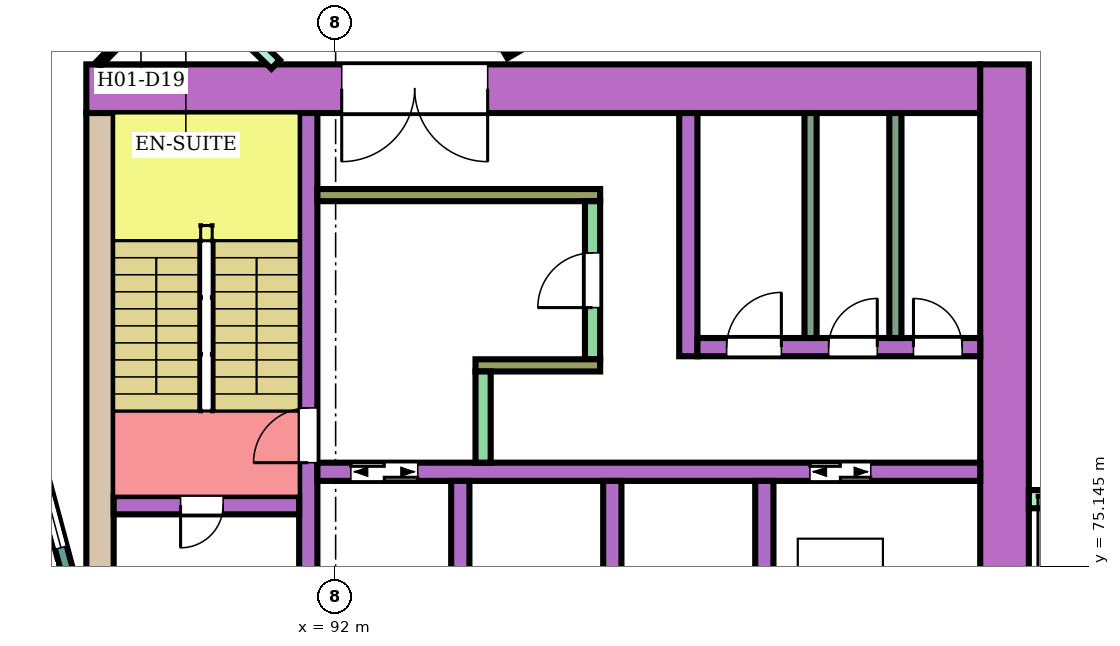
"""IFC4 building model, lengths in metres.
Left out: names, types, materials, properties, quantities, classifications, styles, units other than length and angle.
Written with IfcOpenShell. Run it as: python <this file> out.ifc"""

import sys

from ifc_helpers import new_model, si_unit, direction, frame, frame_2d, origin, place, context, subcontext, project, spatial, rectangle, extrude, element, fill, save


model = new_model("IFC4")
c1 = context("Model", 3, precision=1e-05, world=origin(), true_north=direction((0.0, 1.0)))
c2 = subcontext(c1, "Body", "Model", "MODEL_VIEW")
j1 = project(units=[si_unit("LENGTHUNIT", "METRE"), si_unit("PLANEANGLEUNIT", "RADIAN")], contexts=[c1])
p1 = place(None, origin())
s1 = spatial("IfcSite", under=j1, at=p1, CompositionType="ELEMENT")
p2 = place(p1, origin())
s2 = spatial("IfcBuilding", under=s1, at=p2, CompositionType="ELEMENT")
p3 = place(p2, frame((0.0, 0.0, 28.8)))
s3 = spatial("IfcBuildingStorey", under=s2, at=p3, CompositionType="ELEMENT", Elevation=28.8)
p4 = place(p3, frame((87.9, 83.0, 0.0), z_axis=(0.0, 0.0, 1.0), x_axis=(1.0, 0.0, 0.0)))
e1 = element("IfcWall", 1, at=p4, inside=s3, PredefinedType="SHEAR", context=c2, shape_type="SweptSolid", body=[
    extrude(rectangle(XDim=14.7, YDim=0.8, at=frame_2d((7.35, 0.0))), origin(), (0.0, 0.0, 1.0), 3.48),
])
p5 = place(p4, frame((4.2, 0.0, 0.0)))
e2 = element("IfcOpeningElement", 2, at=p5, cuts=e1, PredefinedType="OPENING", context=c2, shape_type="SweptSolid", body=[
    extrude(rectangle(XDim=2.4, YDim=2.4, at=frame_2d((1.2, 1.2))), frame((0.0, 0.41, 0.0), z_axis=(0.0, -1.0, 0.0), x_axis=(1.0, 0.0, 0.0)), (0.0, 0.0, 1.0), 0.82),
])
p6 = place(p3, frame((88.125, 75.0, 0.0), z_axis=(0.0, 0.0, 1.0), x_axis=(0.0, 1.0, 0.0)))
e3 = element("IfcWall", 3, at=p6, inside=s3, PredefinedType="SHEAR", context=c2, shape_type="SweptSolid", body=[
    extrude(rectangle(XDim=7.6, YDim=0.45, at=frame_2d((3.8, 0.0))), origin(), (0.0, 0.0, 1.0), 3.48),
])
p7 = place(p3, frame((103.0, 66.6, 0.0), z_axis=(0.0, 0.0, 1.0), x_axis=(0.0, 1.0, 0.0)))
e4 = element("IfcWall", 4, at=p7, inside=s3, PredefinedType="SHEAR", context=c2, shape_type="SweptSolid", body=[
    extrude(rectangle(XDim=16.8, YDim=0.8, at=frame_2d((8.4, 0.0))), origin(), (0.0, 0.0, 1.0), 3.48),
])
p8 = place(p3, frame((91.55, 75.0, 0.0), z_axis=(0.0, 0.0, 1.0), x_axis=(0.0, 1.0, 0.0)))
e5 = element("IfcWall", 5, at=p8, inside=s3, PredefinedType="SHEAR", context=c2, shape_type="SweptSolid", body=[
    extrude(rectangle(XDim=7.6, YDim=0.3, at=frame_2d((3.8, 0.0))), origin(), (0.0, 0.0, 1.0), 3.48),
])
p9 = place(p8, frame((1.85, 0.0, 0.0)))
e6 = element("IfcOpeningElement", 6, at=p9, cuts=e5, PredefinedType="OPENING", context=c2, shape_type="SweptSolid", body=[
    extrude(rectangle(XDim=0.9, YDim=2.1, at=frame_2d((0.45, 1.05))), frame((0.0, 0.16, 0.0), z_axis=(0.0, -1.0, 0.0), x_axis=(1.0, 0.0, 0.0)), (0.0, 0.0, 1.0), 0.32),
])
p10 = place(p3, frame((88.35, 76.15, 0.0), z_axis=(0.0, 0.0, 1.0), x_axis=(1.0, 0.0, 0.0)))
e7 = element("IfcWall", 7, at=p10, inside=s3, PredefinedType="SHEAR", context=c2, shape_type="SweptSolid", body=[
    extrude(rectangle(XDim=3.05, YDim=0.3, at=frame_2d((1.525, 0.0))), origin(), (0.0, 0.0, 1.0), 3.48),
])
p11 = place(p10, frame((1.1, 0.0, 0.0)))
e8 = element("IfcOpeningElement", 8, at=p11, cuts=e7, PredefinedType="OPENING", context=c2, shape_type="SweptSolid", body=[
    extrude(rectangle(XDim=0.7, YDim=2.0, at=frame_2d((0.35, 1.0))), frame((0.0, 0.16, 0.0), z_axis=(0.0, -1.0, 0.0), x_axis=(1.0, 0.0, 0.0)), (0.0, 0.0, 1.0), 0.32),
])
p12 = place(p3, frame((91.7, 76.7, 0.0), z_axis=(0.0, 0.0, 1.0), x_axis=(1.0, 0.0, 0.0)))
e9 = element("IfcWall", 9, at=p12, inside=s3, PredefinedType="SHEAR", context=c2, shape_type="SweptSolid", body=[
    extrude(rectangle(XDim=10.9, YDim=0.3, at=frame_2d((5.45, 0.0))), origin(), (0.0, 0.0, 1.0), 3.48),
])
p13 = place(p12, frame((0.55, 0.0, 0.0)))
e10 = element("IfcOpeningElement", 10, at=p13, cuts=e9, PredefinedType="OPENING", context=c2, shape_type="SweptSolid", body=[
    extrude(rectangle(XDim=1.1, YDim=2.1, at=frame_2d((0.55, 1.05))), frame((0.0, 0.16, 0.0), z_axis=(0.0, -1.0, 0.0), x_axis=(1.0, 0.0, 0.0)), (0.0, 0.0, 1.0), 0.32),
])
p14 = place(p12, frame((8.1, 0.0, 0.0)))
e11 = element("IfcOpeningElement", 11, at=p14, cuts=e9, PredefinedType="OPENING", context=c2, shape_type="SweptSolid", body=[
    extrude(rectangle(XDim=1.0, YDim=2.1, at=frame_2d((0.5, 1.05))), frame((0.0, 0.16, 0.0), z_axis=(0.0, -1.0, 0.0), x_axis=(1.0, 0.0, 0.0)), (0.0, 0.0, 1.0), 0.32),
])
for number, where, z_axis, x_axis in (
    (12, (94.05, 74.0, 0.0), (0.0, 0.0, 1.0), (0.0, 1.0, 0.0)),
    (13, (96.55, 74.0, 0.0), (0.0, 0.0, 1.0), (0.0, 1.0, 0.0)),
    (14, (99.05, 74.0, 0.0), (0.0, 0.0, 1.0), (0.0, 1.0, 0.0)),
):
    element("IfcWall", number, at=place(p3, frame(where, z_axis=z_axis, x_axis=x_axis)), inside=s3, PredefinedType="SHEAR", context=c2, shape_type="SweptSolid", body=[
        extrude(rectangle(XDim=2.55, YDim=0.3, at=frame_2d((1.275, 0.0))), origin(), (0.0, 0.0, 1.0), 3.48),
    ])
p15 = place(p3, frame((91.7, 81.25, 0.0), z_axis=(0.0, 0.0, 1.0), x_axis=(1.0, 0.0, 0.0)))
e15 = element("IfcWall", 15, at=p15, inside=s3, PredefinedType="SHEAR", context=c2, shape_type="SweptSolid", body=[
    extrude(rectangle(XDim=4.65, YDim=0.2, at=frame_2d((2.325, 0.0))), origin(), (0.0, 0.0, 1.0), 3.48),
])
p16 = place(p3, frame((96.225, 78.55, 0.0), z_axis=(0.0, 0.0, 1.0), x_axis=(0.0, 1.0, 0.0)))
e16 = element("IfcWall", 16, at=p16, inside=s3, PredefinedType="SHEAR", context=c2, shape_type="SweptSolid", body=[
    extrude(rectangle(XDim=2.6, YDim=0.25, at=frame_2d((1.3, 0.0))), origin(), (0.0, 0.0, 1.0), 3.48),
])
p17 = place(p16, frame((0.85, 0.0, 0.0)))
e17 = element("IfcOpeningElement", 17, at=p17, cuts=e16, PredefinedType="OPENING", context=c2, shape_type="SweptSolid", body=[
    extrude(rectangle(XDim=0.9, YDim=2.1, at=frame_2d((0.45, 1.05))), frame((0.0, 0.135, 0.0), z_axis=(0.0, -1.0, 0.0), x_axis=(1.0, 0.0, 0.0)), (0.0, 0.0, 1.0), 0.27),
])
p18 = place(p3, frame((94.3, 78.45, 0.0), z_axis=(0.0, 0.0, 1.0), x_axis=(1.0, 0.0, 0.0)))
e18 = element("IfcWall", 18, at=p18, inside=s3, PredefinedType="SHEAR", context=c2, shape_type="SweptSolid", body=[
    extrude(rectangle(XDim=2.05, YDim=0.2, at=frame_2d((1.025, 0.0))), origin(), (0.0, 0.0, 1.0), 3.48),
])
p19 = place(p3, frame((94.425, 76.85, 0.0), z_axis=(0.0, 0.0, 1.0), x_axis=(0.0, 1.0, 0.0)))
e19 = element("IfcWall", 19, at=p19, inside=s3, PredefinedType="SHEAR", context=c2, shape_type="SweptSolid", body=[
    extrude(rectangle(XDim=1.5, YDim=0.25, at=frame_2d((0.75, 0.0))), origin(), (0.0, 0.0, 1.0), 3.48),
])
p20 = place(p3, frame((97.8, 78.6, 0.0), z_axis=(0.0, 0.0, 1.0), x_axis=(0.0, 1.0, 0.0)))
e20 = element("IfcWall", 20, at=p20, inside=s3, PredefinedType="SHEAR", context=c2, shape_type="SweptSolid", body=[
    extrude(rectangle(XDim=4.0, YDim=0.3, at=frame_2d((2.0, 0.0))), origin(), (0.0, 0.0, 1.0), 3.48),
])
p21 = place(p3, frame((97.95, 78.75, 0.0), z_axis=(0.0, 0.0, 1.0), x_axis=(1.0, 0.0, 0.0)))
e21 = element("IfcWall", 21, at=p21, inside=s3, PredefinedType="SHEAR", context=c2, shape_type="SweptSolid", body=[
    extrude(rectangle(XDim=4.65, YDim=0.3, at=frame_2d((2.325, 0.0))), origin(), (0.0, 0.0, 1.0), 3.48),
])
p22 = place(p21, frame((0.48, 0.0, 0.0)))
e22 = element("IfcOpeningElement", 22, at=p22, cuts=e21, PredefinedType="OPENING", context=c2, shape_type="SweptSolid", body=[
    extrude(rectangle(XDim=0.9, YDim=2.1, at=frame_2d((0.45, 1.05))), frame((0.0, 0.16, 0.0), z_axis=(0.0, -1.0, 0.0), x_axis=(1.0, 0.0, 0.0)), (0.0, 0.0, 1.0), 0.32),
])
p23 = place(p21, frame((2.157, 0.0, 0.0)))
e23 = element("IfcOpeningElement", 23, at=p23, cuts=e21, PredefinedType="OPENING", context=c2, shape_type="SweptSolid", body=[
    extrude(rectangle(XDim=0.8, YDim=2.1, at=frame_2d((0.4, 1.05))), frame((0.0, 0.16, 0.0), z_axis=(0.0, -1.0, 0.0), x_axis=(1.0, 0.0, 0.0)), (0.0, 0.0, 1.0), 0.32),
])
p24 = place(p21, frame((3.552, 0.0, 0.0)))
e24 = element("IfcOpeningElement", 24, at=p24, cuts=e21, PredefinedType="OPENING", context=c2, shape_type="SweptSolid", body=[
    extrude(rectangle(XDim=0.8, YDim=2.1, at=frame_2d((0.4, 1.05))), frame((0.0, 0.16, 0.0), z_axis=(0.0, -1.0, 0.0), x_axis=(1.0, 0.0, 0.0)), (0.0, 0.0, 1.0), 0.32),
])
p25 = place(p3, frame((105.017, 81.703, 0.0), z_axis=(0.0, 0.0, 1.0), x_axis=(-0.382694096902, 0.923875115043, 0.0)))
e25 = element("IfcWall", 25, at=p25, inside=s3, PredefinedType="NOTDEFINED", context=c2, shape_type="SweptSolid", body=[
    extrude(rectangle(XDim=6.761, YDim=0.2, at=frame_2d((3.38, 0.0))), origin(), (0.0, 0.0, 1.0), 3.8),
])
p26 = place(p25, frame((0.527, 0.0, 0.9)))
e26 = element("IfcOpeningElement", 26, at=p26, cuts=e25, PredefinedType="OPENING", context=c2, shape_type="SweptSolid", body=[
    extrude(rectangle(XDim=1.2, YDim=2.4, at=frame_2d((0.6, 1.2))), frame((0.0, 0.11, 0.0), z_axis=(0.0, -1.0, 0.0), x_axis=(1.0, 0.0, 0.0)), (0.0, 0.0, 1.0), 0.22),
])
p27 = place(p25, frame((2.48, 0.0, 0.0)))
e27 = element("IfcOpeningElement", 27, at=p27, cuts=e25, PredefinedType="OPENING", context=c2, shape_type="SweptSolid", body=[
    extrude(rectangle(XDim=1.8, YDim=2.4, at=frame_2d((0.9, 1.2))), frame((0.0, 0.11, 0.0), z_axis=(0.0, -1.0, 0.0), x_axis=(1.0, 0.0, 0.0)), (0.0, 0.0, 1.0), 0.22),
])
p28 = place(p25, frame((5.034, 0.0, 0.9)))
e28 = element("IfcOpeningElement", 28, at=p28, cuts=e25, PredefinedType="OPENING", context=c2, shape_type="SweptSolid", body=[
    extrude(rectangle(XDim=1.2, YDim=2.4, at=frame_2d((0.6, 1.2))), frame((0.0, 0.11, 0.0), z_axis=(0.0, -1.0, 0.0), x_axis=(1.0, 0.0, 0.0)), (0.0, 0.0, 1.0), 0.22),
])
p29 = place(p3, frame((103.4, 76.25, 0.0), z_axis=(0.0, 0.0, 1.0), x_axis=(1.0, 0.0, 0.0)))
e29 = element("IfcWall", 29, at=p29, inside=s3, PredefinedType="NOTDEFINED", context=c2, shape_type="SweptSolid", body=[
    extrude(rectangle(XDim=2.416, YDim=0.3, at=frame_2d((1.208, 0.0))), origin(), (0.0, 0.0, 1.0), 3.8),
])
p30 = place(p3, frame((87.604, 75.0, 0.0), z_axis=(0.0, 0.0, 1.0), x_axis=(-0.258789828301, 0.965933654434, 0.0)))
e30 = element("IfcWall", 30, at=p30, inside=s3, PredefinedType="NOTDEFINED", context=c2, shape_type="SweptSolid", body=[
    extrude(rectangle(XDim=3.936, YDim=0.2, at=frame_2d((1.968, 0.0))), origin(), (0.0, 0.0, 1.0), 3.8),
])
p31 = place(p30, frame((0.468, 0.0, 0.9)))
e31 = element("IfcOpeningElement", 31, at=p31, cuts=e30, PredefinedType="OPENING", context=c2, shape_type="SweptSolid", body=[
    extrude(rectangle(XDim=3.0, YDim=2.3, at=frame_2d((1.5, 1.15))), frame((0.0, 0.11, 0.0), z_axis=(0.0, -1.0, 0.0), x_axis=(1.0, 0.0, 0.0)), (0.0, 0.0, 1.0), 0.22),
])
p32 = place(p3, frame((87.064, 87.211, 0.0), z_axis=(0.0, 0.0, 1.0), x_axis=(0.719540958932, -0.694450004262, 0.0)))
e32 = element("IfcWall", 32, at=p32, inside=s3, PredefinedType="PARTITIONING", context=c2, shape_type="SweptSolid", body=[
    extrude(rectangle(XDim=5.488, YDim=0.2, at=frame_2d((2.744, 0.0))), origin(), (0.0, 0.0, 1.0), 3.35),
])
p33 = place(p32, frame((0.55, 0.0, 0.0)))
e33 = element("IfcOpeningElement", 33, at=p33, cuts=e32, PredefinedType="OPENING", context=c2, shape_type="SweptSolid", body=[
    extrude(rectangle(XDim=1.0, YDim=2.1, at=frame_2d((0.5, 1.05))), frame((0.0, 0.11, 0.0), z_axis=(0.0, -1.0, 0.0), x_axis=(1.0, 0.0, 0.0)), (0.0, 0.0, 1.0), 0.22),
])
p34 = place(p3, frame((88.095, 83.4, 0.0), z_axis=(0.0, 0.0, 1.0), x_axis=(0.694447472534, 0.719543402368, 0.0)))
e34 = element("IfcWall", 34, at=p34, inside=s3, PredefinedType="PARTITIONING", context=c2, shape_type="SweptSolid", body=[
    extrude(rectangle(XDim=1.926, YDim=0.1, at=frame_2d((0.963, 0.0))), origin(), (0.0, 0.0, 1.0), 3.35),
])
p35 = place(p34, frame((0.613, 0.0, 0.0)))
e35 = element("IfcOpeningElement", 35, at=p35, cuts=e34, PredefinedType="OPENING", context=c2, shape_type="SweptSolid", body=[
    extrude(rectangle(XDim=0.8, YDim=2.1, at=frame_2d((0.4, 1.05))), frame((0.0, 0.06, 0.0), z_axis=(0.0, -1.0, 0.0), x_axis=(1.0, 0.0, 0.0)), (0.0, 0.0, 1.0), 0.12),
])
p36 = place(p3, frame((94.8, 83.545, 0.0), z_axis=(0.0, 0.0, 1.0), x_axis=(0.86602264145, 0.500004784474, 0.0)))
e36 = element("IfcWall", 36, at=p36, inside=s3, PredefinedType="PARTITIONING", context=c2, shape_type="SweptSolid", body=[
    extrude(rectangle(XDim=8.708, YDim=0.1, at=frame_2d((4.354, 0.0))), origin(), (0.0, 0.0, 1.0), 3.35),
])
p37 = place(p36, frame((3.879, 0.0, 0.0)))
e37 = element("IfcOpeningElement", 37, at=p37, cuts=e36, PredefinedType="OPENING", context=c2, shape_type="SweptSolid", body=[
    extrude(rectangle(XDim=0.9, YDim=2.1, at=frame_2d((0.45, 1.05))), frame((0.0, 0.06, 0.0), z_axis=(0.0, -1.0, 0.0), x_axis=(1.0, 0.0, 0.0)), (0.0, 0.0, 1.0), 0.12),
])
for number, where, z_axis, x_axis in (
    (38, (99.81, 78.9, 0.0), (0.0, 0.0, 1.0), (0.0, 1.0, 0.0)),
    (39, (101.205, 78.9, 0.0), (0.0, 0.0, 1.0), (0.0, 1.0, 0.0)),
):
    element("IfcWall", number, at=place(p3, frame(where, z_axis=z_axis, x_axis=x_axis)), inside=s3, PredefinedType="PARTITIONING", context=c2, shape_type="SweptSolid", body=[
        extrude(rectangle(XDim=3.7, YDim=0.2, at=frame_2d((1.85, 0.0))), origin(), (0.0, 0.0, 1.0), 3.48),
    ])
p38 = place(p31, origin())
e40 = element("IfcWindow", 40, at=p38, inside=s3, PartitioningType="SINGLE_PANEL", PredefinedType="WINDOW", context=c2, shape_type="SweptSolid", body=[
    extrude(rectangle(XDim=3.0, YDim=2.3, at=frame_2d((1.5, 1.15))), frame((0.0, 0.03, 0.0), z_axis=(0.0, -1.0, 0.0), x_axis=(1.0, 0.0, 0.0)), (0.0, 0.0, 1.0), 0.06),
])
fill(e31, e40)
p39 = place(p11, frame((0.7, 0.0, 0.0), z_axis=(0.0, 0.0, 1.0), x_axis=(-1.0, 0.0, 0.0)))
e41 = element("IfcDoor", 41, at=p39, inside=s3, OperationType="SINGLE_SWING_RIGHT", PredefinedType="DOOR", context=c2, shape_type="SweptSolid", body=[
    extrude(rectangle(XDim=0.7, YDim=2.0, at=frame_2d((0.35, 1.0))), frame((0.0, 0.025, 0.0), z_axis=(0.0, -1.0, 0.0), x_axis=(1.0, 0.0, 0.0)), (0.0, 0.0, 1.0), 0.05),
])
fill(e8, e41)
p40 = place(p9, origin())
e42 = element("IfcDoor", 42, at=p40, inside=s3, OperationType="SINGLE_SWING_LEFT", PredefinedType="DOOR", context=c2, shape_type="SweptSolid", body=[
    extrude(rectangle(XDim=0.9, YDim=2.1, at=frame_2d((0.45, 1.05))), frame((0.0, 0.025, 0.0), z_axis=(0.0, -1.0, 0.0), x_axis=(1.0, 0.0, 0.0)), (0.0, 0.0, 1.0), 0.05),
])
fill(e6, e42)
p41 = place(p13, origin())
e43 = element("IfcDoor", 43, at=p41, inside=s3, OperationType="DOUBLE_DOOR_SLIDING", PredefinedType="DOOR", context=c2, shape_type="SweptSolid", body=[
    extrude(rectangle(XDim=1.1, YDim=2.1, at=frame_2d((0.55, 1.05))), frame((0.0, 0.025, 0.0), z_axis=(0.0, -1.0, 0.0), x_axis=(1.0, 0.0, 0.0)), (0.0, 0.0, 1.0), 0.05),
])
fill(e10, e43)
p42 = place(p14, origin())
e44 = element("IfcDoor", 44, at=p42, inside=s3, OperationType="DOUBLE_DOOR_SLIDING", PredefinedType="DOOR", context=c2, shape_type="SweptSolid", body=[
    extrude(rectangle(XDim=1.0, YDim=2.1, at=frame_2d((0.5, 1.05))), frame((0.0, 0.025, 0.0), z_axis=(0.0, -1.0, 0.0), x_axis=(1.0, 0.0, 0.0)), (0.0, 0.0, 1.0), 0.05),
])
fill(e11, e44)
p43 = place(p17, origin())
e45 = element("IfcDoor", 45, at=p43, inside=s3, OperationType="SINGLE_SWING_LEFT", PredefinedType="DOOR", context=c2, shape_type="SweptSolid", body=[
    extrude(rectangle(XDim=0.9, YDim=2.1, at=frame_2d((0.45, 1.05))), frame((0.0, 0.025, 0.0), z_axis=(0.0, -1.0, 0.0), x_axis=(1.0, 0.0, 0.0)), (0.0, 0.0, 1.0), 0.05),
])
fill(e17, e45)
p44 = place(p22, origin())
e46 = element("IfcDoor", 46, at=p44, inside=s3, OperationType="SINGLE_SWING_RIGHT", PredefinedType="DOOR", context=c2, shape_type="SweptSolid", body=[
    extrude(rectangle(XDim=0.9, YDim=2.1, at=frame_2d((0.45, 1.05))), frame((0.0, 0.025, 0.0), z_axis=(0.0, -1.0, 0.0), x_axis=(1.0, 0.0, 0.0)), (0.0, 0.0, 1.0), 0.05),
])
fill(e22, e46)
p45 = place(p23, origin())
e47 = element("IfcDoor", 47, at=p45, inside=s3, OperationType="SINGLE_SWING_RIGHT", PredefinedType="DOOR", context=c2, shape_type="SweptSolid", body=[
    extrude(rectangle(XDim=0.8, YDim=2.1, at=frame_2d((0.4, 1.05))), frame((0.0, 0.025, 0.0), z_axis=(0.0, -1.0, 0.0), x_axis=(1.0, 0.0, 0.0)), (0.0, 0.0, 1.0), 0.05),
])
fill(e23, e47)
p46 = place(p24, origin())
e48 = element("IfcDoor", 48, at=p46, inside=s3, OperationType="SINGLE_SWING_LEFT", PredefinedType="DOOR", context=c2, shape_type="SweptSolid", body=[
    extrude(rectangle(XDim=0.8, YDim=2.1, at=frame_2d((0.4, 1.05))), frame((0.0, 0.025, 0.0), z_axis=(0.0, -1.0, 0.0), x_axis=(1.0, 0.0, 0.0)), (0.0, 0.0, 1.0), 0.05),
])
fill(e24, e48)
p47 = place(p5, frame((2.4, 0.0, 0.0), z_axis=(0.0, 0.0, 1.0), x_axis=(-1.0, 0.0, 0.0)))
e49 = element("IfcDoor", 49, at=p47, inside=s3, OperationType="DOUBLE_DOOR_SINGLE_SWING", PredefinedType="DOOR", context=c2, shape_type="SweptSolid", body=[
    extrude(rectangle(XDim=2.4, YDim=2.4, at=frame_2d((1.2, 1.2))), frame((0.0, 0.025, 0.0), z_axis=(0.0, -1.0, 0.0), x_axis=(1.0, 0.0, 0.0)), (0.0, 0.0, 1.0), 0.05),
])
fill(e2, e49)
save(model, sys.argv[1])
